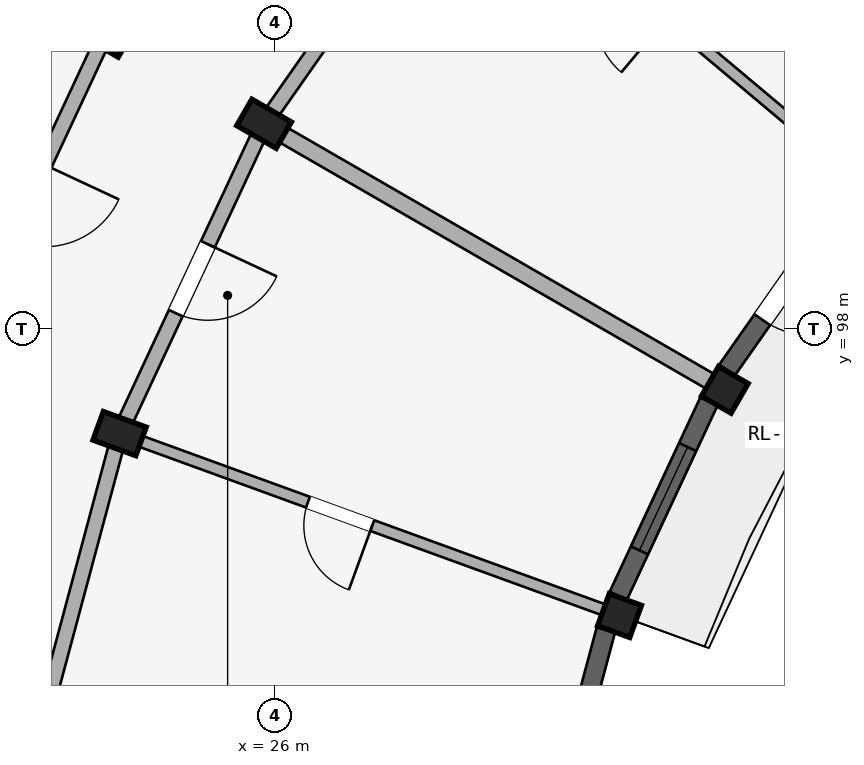
"""IFC4 building model, lengths in metres.
Left out: names, types, materials, properties, quantities, classifications, styles, units other than length and angle.
Written with IfcOpenShell. Run it as: python <this file> out.ifc"""

import sys

from ifc_helpers import new_model, si_unit, direction, frame, frame_2d, origin, origin_2d, place, context, subcontext, project, spatial, rectangle, extrude, element, fill, save


model = new_model("IFC4")
c1 = context("Model", 3, precision=1e-05, world=origin(), true_north=direction((0.0, 1.0)))
c2 = subcontext(c1, "Body", "Model", "MODEL_VIEW")
j1 = project(units=[si_unit("LENGTHUNIT", "METRE"), si_unit("PLANEANGLEUNIT", "RADIAN")], contexts=[c1])
p1 = place(None, origin())
s1 = spatial("IfcSite", under=j1, at=p1, CompositionType="ELEMENT")
p2 = place(p1, origin())
s2 = spatial("IfcBuilding", under=s1, at=p2, CompositionType="ELEMENT")
p3 = place(p2, frame((0.0, 0.0, 43.35)))
s3 = spatial("IfcBuildingStorey", under=s2, at=p3, CompositionType="ELEMENT", Elevation=43.35)
p4 = place(p3, frame((31.919, 97.2, 0.0), z_axis=(0.0, 0.0, 1.0), x_axis=(0.5, 0.866025403784, 0.0)))
e1 = element("IfcColumn", 1, at=p4, inside=s3, PredefinedType="COLUMN", context=c2, shape_type="SweptSolid", body=[
    extrude(rectangle(XDim=0.45, YDim=0.45, at=origin_2d()), origin(), (0.0, 0.0, 1.0), 2.93),
])
for number, where, z_axis, x_axis in (
    (2, (25.856, 100.7, 0.0), (0.0, 0.0, 1.0), (0.5, 0.866, 0.0)),
    (3, (23.778, 101.9, 0.0), (0.0, 0.0, 1.0), (0.5, 0.866, 0.0)),
):
    element("IfcColumn", number, at=place(p3, frame(where, z_axis=z_axis, x_axis=x_axis)), inside=s3, PredefinedType="COLUMN", context=c2, shape_type="SweptSolid", body=[
        extrude(rectangle(XDim=0.4, YDim=0.6, at=origin_2d()), origin(), (0.0, 0.0, 1.0), 2.93),
    ])
p5 = place(p3, frame((30.534, 94.23, 0.0), z_axis=(0.0, 0.0, 1.0), x_axis=(0.342020143326, 0.939692620786, 0.0)))
e4 = element("IfcColumn", 4, at=p5, inside=s3, PredefinedType="COLUMN", context=c2, shape_type="SweptSolid", body=[
    extrude(rectangle(XDim=0.45, YDim=0.45, at=origin_2d()), origin(), (0.0, 0.0, 1.0), 2.93),
])
p6 = place(p3, frame((23.956, 96.624, 0.0), z_axis=(0.0, 0.0, 1.0), x_axis=(0.342020143326, 0.939692620786, 0.0)))
e5 = element("IfcColumn", 5, at=p6, inside=s3, PredefinedType="COLUMN", context=c2, shape_type="SweptSolid", body=[
    extrude(rectangle(XDim=0.4, YDim=0.6, at=origin_2d()), origin(), (0.0, 0.0, 1.0), 2.93),
])
p7 = place(p3, frame((28.436, 104.384, 0.0), z_axis=(0.0, 0.0, 1.0), x_axis=(-0.573571637217, -0.819155404658, 0.0)))
e6 = element("IfcWall", 6, at=p7, inside=s3, PredefinedType="STANDARD", context=c2, shape_type="SweptSolid", body=[
    extrude(rectangle(XDim=4.497, YDim=0.2, at=frame_2d((2.249, 0.0))), origin(), (0.0, 0.0, 1.0), 2.372),
])
p8 = place(p3, frame((25.856, 100.7, 0.0), z_axis=(0.0, 0.0, 1.0), x_axis=(-0.422617978463, -0.906307919131, 0.0)))
e7 = element("IfcWall", 7, at=p8, inside=s3, PredefinedType="STANDARD", context=c2, shape_type="SweptSolid", body=[
    extrude(rectangle(XDim=4.497, YDim=0.2, at=frame_2d((2.249, 0.0))), origin(), (0.0, 0.0, 1.0), 2.372),
])
p9 = place(p8, frame((1.749, 0.0, 0.0)))
e8 = element("IfcOpeningElement", 8, at=p9, cuts=e7, PredefinedType="OPENING", context=c2, shape_type="SweptSolid", body=[
    extrude(rectangle(XDim=1.0, YDim=2.15, at=frame_2d((0.5, 1.075))), frame((0.0, 0.11, 0.0), z_axis=(0.0, -1.0, 0.0), x_axis=(1.0, 0.0, 0.0)), (0.0, 0.0, 1.0), 0.22),
])
p10 = place(p3, frame((23.778, 101.9, 0.0), z_axis=(0.0, 0.0, 1.0), x_axis=(-0.422629854778, -0.906302381024, 0.0)))
e9 = element("IfcWall", 9, at=p10, inside=s3, PredefinedType="STANDARD", context=c2, shape_type="SweptSolid", body=[
    extrude(rectangle(XDim=4.915, YDim=0.2, at=frame_2d((2.458, 0.0))), origin(), (0.0, 0.0, 1.0), 2.372),
])
p11 = place(p10, frame((1.918, 0.0, 0.0)))
e10 = element("IfcOpeningElement", 10, at=p11, cuts=e9, PredefinedType="OPENING", context=c2, shape_type="SweptSolid", body=[
    extrude(rectangle(XDim=1.08, YDim=2.15, at=frame_2d((0.54, 1.075))), frame((0.0, 0.11, 0.0), z_axis=(0.0, -1.0, 0.0), x_axis=(1.0, 0.0, 0.0)), (0.0, 0.0, 1.0), 0.22),
])
p12 = place(p3, frame((23.956, 96.624, 0.0), z_axis=(0.0, 0.0, 1.0), x_axis=(-0.258787642463, -0.965934240054, 0.0)))
e11 = element("IfcWall", 11, at=p12, inside=s3, PredefinedType="STANDARD", context=c2, shape_type="SweptSolid", body=[
    extrude(rectangle(XDim=4.497, YDim=0.2, at=frame_2d((2.249, 0.0))), origin(), (0.0, 0.0, 1.0), 2.372),
])
p13 = place(p3, frame((33.645, 100.013, 0.0), z_axis=(0.0, 0.0, 1.0), x_axis=(-0.766046761698, 0.642784846501, 0.0)))
e12 = element("IfcWall", 12, at=p13, inside=s3, PredefinedType="PARTITIONING", context=c2, shape_type="SweptSolid", body=[
    extrude(rectangle(XDim=6.75, YDim=0.15, at=frame_2d((3.375, 0.0))), origin(), (0.0, 0.0, 1.0), 2.372),
])
p14 = place(p13, frame((3.242, 0.0, 0.0)))
e13 = element("IfcOpeningElement", 13, at=p14, cuts=e12, PredefinedType="OPENING", context=c2, shape_type="SweptSolid", body=[
    extrude(rectangle(XDim=0.94, YDim=2.1, at=frame_2d((0.47, 1.05))), frame((0.0, 0.085, 0.0), z_axis=(0.0, -1.0, 0.0), x_axis=(1.0, 0.0, 0.0)), (0.0, 0.0, 1.0), 0.17),
])
p15 = place(p3, frame((31.746, 97.3, 0.0), z_axis=(0.0, 0.0, 1.0), x_axis=(-0.866026575979, 0.499997969693, 0.0)))
e14 = element("IfcWall", 14, at=p15, inside=s3, PredefinedType="STANDARD", context=c2, shape_type="SweptSolid", body=[
    extrude(rectangle(XDim=6.75, YDim=0.22, at=frame_2d((3.375, 0.0))), origin(), (0.0, 0.0, 1.0), 2.372),
])
p16 = place(p3, frame((30.346, 94.298, 0.0), z_axis=(0.0, 0.0, 1.0), x_axis=(-0.939696231917, 0.342010221662, 0.0)))
e15 = element("IfcWall", 15, at=p16, inside=s3, PredefinedType="PARTITIONING", context=c2, shape_type="SweptSolid", body=[
    extrude(rectangle(XDim=6.75, YDim=0.15, at=frame_2d((3.375, 0.0))), origin(), (0.0, 0.0, 1.0), 2.372),
])
p17 = place(p16, frame((3.262, 0.0, 0.0)))
e16 = element("IfcOpeningElement", 16, at=p17, cuts=e15, PredefinedType="OPENING", context=c2, shape_type="SweptSolid", body=[
    extrude(rectangle(XDim=0.9, YDim=2.1, at=frame_2d((0.45, 1.05))), frame((0.0, 0.085, 0.0), z_axis=(0.0, -1.0, 0.0), x_axis=(1.0, 0.0, 0.0)), (0.0, 0.0, 1.0), 0.17),
])
p18 = place(p3, frame((33.565, 99.769, 0.0), z_axis=(0.0, 0.0, 1.0), x_axis=(-0.573572722716, -0.819154644592, 0.0)))
e17 = element("IfcWall", 17, at=p18, inside=s3, PredefinedType="STANDARD", context=c2, shape_type="SweptSolid", body=[
    extrude(rectangle(XDim=2.82, YDim=0.25, at=frame_2d((1.41, 0.0))), origin(), (0.0, 0.0, 1.0), 2.422),
])
p19 = place(p18, frame((0.81, 0.0, 0.0)))
e18 = element("IfcOpeningElement", 18, at=p19, cuts=e17, PredefinedType="OPENING", context=c2, shape_type="SweptSolid", body=[
    extrude(rectangle(XDim=1.2, YDim=2.15, at=frame_2d((0.6, 1.075))), frame((0.0, 0.135, 0.0), z_axis=(0.0, -1.0, 0.0), x_axis=(1.0, 0.0, 0.0)), (0.0, 0.0, 1.0), 0.27),
])
p20 = place(p3, frame((31.709, 97.046, 0.0), z_axis=(0.0, 0.0, 1.0), x_axis=(-0.422667431484, -0.906284857185, 0.0)))
e19 = element("IfcWall", 19, at=p20, inside=s3, PredefinedType="STANDARD", context=c2, shape_type="SweptSolid", body=[
    extrude(rectangle(XDim=2.82, YDim=0.25, at=frame_2d((1.41, 0.0))), origin(), (0.0, 0.0, 1.0), 2.422),
])
p21 = place(p20, frame((0.66, 0.0, 0.572)))
e20 = element("IfcOpeningElement", 20, at=p21, cuts=e19, PredefinedType="OPENING", context=c2, shape_type="SweptSolid", body=[
    extrude(rectangle(XDim=1.5, YDim=1.65, at=frame_2d((0.75, 0.825))), frame((0.0, 0.135, 0.0), z_axis=(0.0, -1.0, 0.0), x_axis=(1.0, 0.0, 0.0)), (0.0, 0.0, 1.0), 0.27),
])
p22 = place(p3, frame((30.354, 94.042, 0.0), z_axis=(0.0, 0.0, 1.0), x_axis=(-0.258837049266, -0.965921001908, 0.0)))
e21 = element("IfcWall", 21, at=p22, inside=s3, PredefinedType="STANDARD", context=c2, shape_type="SweptSolid", body=[
    extrude(rectangle(XDim=2.82, YDim=0.25, at=frame_2d((1.41, 0.0))), origin(), (0.0, 0.0, 1.0), 2.422),
])
p23 = place(p22, frame((0.81, 0.0, 0.722)))
e22 = element("IfcOpeningElement", 22, at=p23, cuts=e21, PredefinedType="OPENING", context=c2, shape_type="SweptSolid", body=[
    extrude(rectangle(XDim=1.2, YDim=1.5, at=frame_2d((0.6, 0.75))), frame((0.0, 0.135, 0.0), z_axis=(0.0, -1.0, 0.0), x_axis=(1.0, 0.0, 0.0)), (0.0, 0.0, 1.0), 0.27),
])
p24 = place(p21, origin())
e23 = element("IfcWindow", 23, at=p24, inside=s3, PartitioningType="DOUBLE_PANEL_VERTICAL", PredefinedType="WINDOW", context=c2, shape_type="SweptSolid", body=[
    extrude(rectangle(XDim=1.5, YDim=1.65, at=frame_2d((0.75, 0.825))), frame((0.0, 0.03, 0.0), z_axis=(0.0, -1.0, 0.0), x_axis=(1.0, 0.0, 0.0)), (0.0, 0.0, 1.0), 0.06),
])
fill(e20, e23)
p25 = place(p17, origin())
e24 = element("IfcDoor", 24, at=p25, inside=s3, OperationType="SINGLE_SWING_LEFT", PredefinedType="DOOR", context=c2, shape_type="SweptSolid", body=[
    extrude(rectangle(XDim=0.9, YDim=2.1, at=frame_2d((0.45, 1.05))), frame((0.0, 0.025, 0.0), z_axis=(0.0, -1.0, 0.0), x_axis=(1.0, 0.0, 0.0)), (0.0, 0.0, 1.0), 0.05),
])
fill(e16, e24)
p26 = place(p9, frame((1.0, 0.0, 0.0), z_axis=(0.0, 0.0, 1.0), x_axis=(-1.0, 0.0, 0.0)))
e25 = element("IfcDoor", 25, at=p26, inside=s3, OperationType="SINGLE_SWING_RIGHT", PredefinedType="DOOR", context=c2, shape_type="SweptSolid", body=[
    extrude(rectangle(XDim=1.0, YDim=2.15, at=frame_2d((0.5, 1.075))), frame((0.0, 0.025, 0.0), z_axis=(0.0, -1.0, 0.0), x_axis=(1.0, 0.0, 0.0)), (0.0, 0.0, 1.0), 0.05),
])
fill(e8, e25)
p27 = place(p19, origin())
e26 = element("IfcDoor", 26, at=p27, inside=s3, OperationType="SINGLE_SWING_LEFT", PredefinedType="DOOR", context=c2, shape_type="SweptSolid", body=[
    extrude(rectangle(XDim=1.2, YDim=2.15, at=frame_2d((0.6, 1.075))), frame((0.0, 0.025, 0.0), z_axis=(0.0, -1.0, 0.0), x_axis=(1.0, 0.0, 0.0)), (0.0, 0.0, 1.0), 0.05),
])
fill(e18, e26)
save(model, sys.argv[1])
